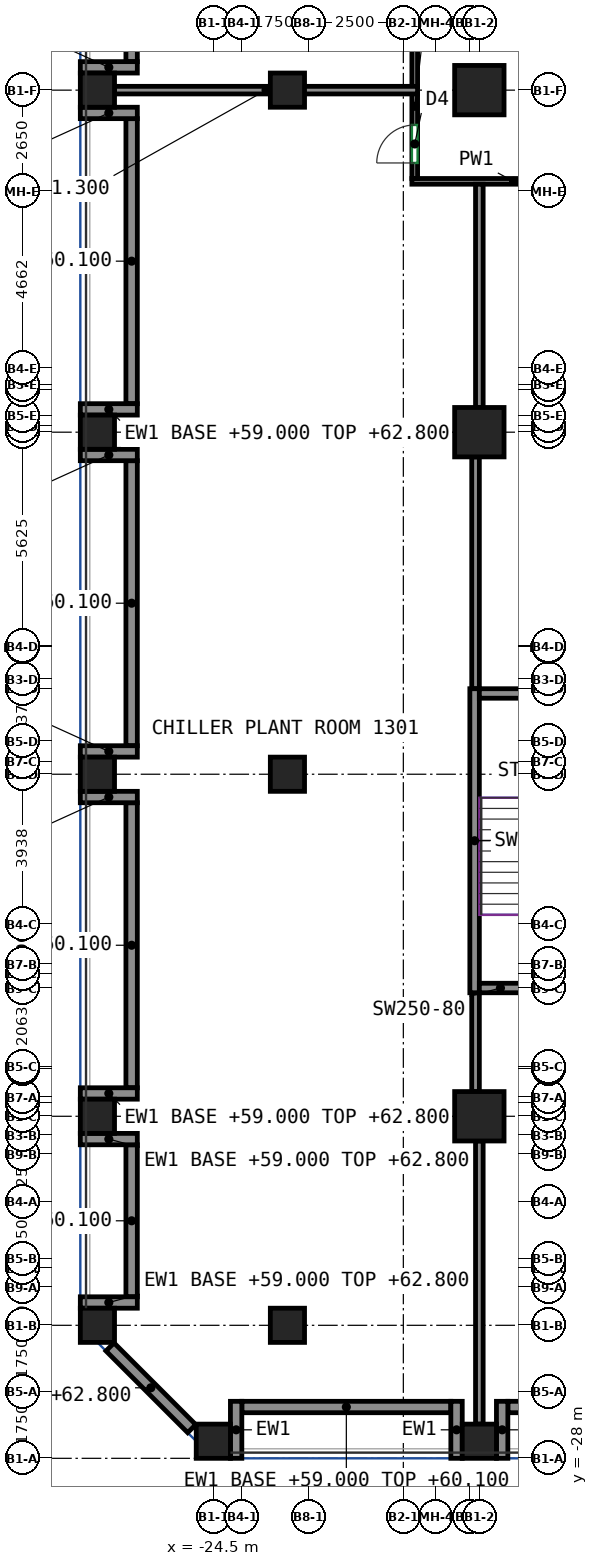
"""IFC4 building model, lengths in metres.
Left out: names, types, materials, properties, quantities, classifications, styles, units other than length and angle.
Written with IfcOpenShell. Run it as: python <this file> out.ifc"""

import sys

from ifc_helpers import new_model, si_unit, direction, frame, frame_2d, origin, origin_2d, place, context, subcontext, project, spatial, rectangle, extrude, source, transform, mapped, element, fill, save


model = new_model("IFC4")
c1 = context("Model", 3, precision=1e-05, world=origin(), true_north=direction((0.0, 1.0)))
c2 = subcontext(c1, "Body", "Model", "MODEL_VIEW")
j1 = project(units=[si_unit("LENGTHUNIT", "METRE"), si_unit("PLANEANGLEUNIT", "RADIAN")], contexts=[c1])
p1 = place(None, origin())
s1 = spatial("IfcSite", under=j1, at=p1, CompositionType="ELEMENT")
p2 = place(p1, origin())
s2 = spatial("IfcBuilding", under=s1, at=p2, CompositionType="ELEMENT")
p3 = place(p2, frame((0.0, 0.0, 59.0)))
s3 = spatial("IfcBuildingStorey", under=s2, at=p3, CompositionType="ELEMENT", Elevation=59.0)
m1 = source(origin(), c2, "Body", "SweptSolid", [
    extrude(rectangle(XDim=0.9, YDim=0.9, at=origin_2d()), origin(), (0.0, 0.0, 1.0), 3.8),
])
p4 = place(p3, frame((-27.55, -24.5, 0.0), z_axis=(0.0, 0.0, 1.0), x_axis=(1.0, 0.0, 0.0)))
e1 = element("IfcColumn", 1, at=p4, inside=s3, PredefinedType="COLUMN", context=c2, shape_type="MappedRepresentation", body=[
    mapped(m1, transform((0.0, 0.0, 0.0))),
])
m2 = source(origin(), c2, "Body", "SweptSolid", [
    extrude(rectangle(XDim=0.9, YDim=0.9, at=origin_2d()), origin(), (0.0, 0.0, 1.0), 2.3),
])
for number, where, z_axis, x_axis in (
    (2, (-27.55, -19.0, 0.0), (0.0, 0.0, 1.0), (1.0, 0.0, 0.0)),
    (3, (-27.55, -10.0, 0.0), (0.0, 0.0, 1.0), (1.0, 0.0, 0.0)),
    (4, (-27.55, -1.0, 0.0), (0.0, 0.0, 1.0), (1.0, 0.0, 0.0)),
    (5, (-27.55, 8.0, 0.0), (0.0, 0.0, 1.0), (1.0, 0.0, 0.0)),
    (6, (-24.5, -27.55, 0.0), (0.0, 0.0, 1.0), (1.0, 0.0, 0.0)),
    (7, (-17.5, -27.55, 0.0), (0.0, 0.0, 1.0), (1.0, 0.0, 0.0)),
):
    element("IfcColumn", number, at=place(p3, frame(where, z_axis=z_axis, x_axis=x_axis)), inside=s3, PredefinedType="COLUMN", context=c2, shape_type="MappedRepresentation", body=[
        mapped(m2, transform((0.0, 0.0, 0.0))),
    ])
m3 = source(origin(), c2, "Body", "SweptSolid", [
    extrude(rectangle(XDim=1.3, YDim=1.3, at=origin_2d()), origin(), (0.0, 0.0, 1.0), 2.3),
])
for number, where, z_axis, x_axis in (
    (8, (-17.5, -19.0, 0.0), (0.0, 0.0, 1.0), (1.0, 0.0, 0.0)),
    (9, (-17.5, -1.0, 0.0), (0.0, 0.0, 1.0), (1.0, 0.0, 0.0)),
    (10, (-17.5, 8.0, 0.0), (0.0, 0.0, 1.0), (1.0, 0.0, 0.0)),
):
    element("IfcColumn", number, at=place(p3, frame(where, z_axis=z_axis, x_axis=x_axis)), inside=s3, PredefinedType="COLUMN", context=c2, shape_type="MappedRepresentation", body=[
        mapped(m3, transform((0.0, 0.0, 0.0))),
    ])
for number, where, z_axis, x_axis in (
    (11, (-22.55, -24.5, 0.0), (0.0, 0.0, 1.0), (1.0, 0.0, 0.0)),
    (12, (-22.55, -10.0, 0.0), (0.0, 0.0, 1.0), (1.0, 0.0, 0.0)),
    (13, (-22.55, 8.0, 0.0), (0.0, 0.0, 1.0), (1.0, 0.0, 0.0)),
):
    element("IfcColumn", number, at=place(p3, frame(where, z_axis=z_axis, x_axis=x_axis)), inside=s3, PredefinedType="COLUMN", context=c2, shape_type="MappedRepresentation", body=[
        mapped(m1, transform((0.0, 0.0, 0.0))),
    ])
m4 = source(origin(), c2, "Body", "SweptSolid", [
    extrude(rectangle(XDim=8.0, YDim=0.25, at=frame_2d((4.0, 0.0))), origin(), (0.0, 0.0, 1.0), 3.8),
])
p5 = place(p3, frame((-17.625, -15.75, 0.0), z_axis=(0.0, 0.0, 1.0), x_axis=(0.0, 1.0, 0.0)))
e14 = element("IfcWall", 14, at=p5, inside=s3, PredefinedType="SHEAR", context=c2, shape_type="MappedRepresentation", body=[
    mapped(m4, transform((0.0, 0.0, 0.0))),
])
m5 = source(origin(), c2, "Body", "SweptSolid", [
    extrude(rectangle(XDim=3.7, YDim=0.25, at=frame_2d((1.85, 0.0))), origin(), (0.0, 0.0, 1.0), 3.8),
])
p6 = place(p3, frame((-17.5, -15.625, 0.0), z_axis=(0.0, 0.0, 1.0), x_axis=(1.0, 0.0, 0.0)))
e15 = element("IfcWall", 15, at=p6, inside=s3, PredefinedType="SHEAR", context=c2, shape_type="MappedRepresentation", body=[
    mapped(m5, transform((0.0, 0.0, 0.0))),
])
p7 = place(p6, frame((1.25, 0.0, 0.0)))
e16 = element("IfcOpeningElement", 16, at=p7, cuts=e15, PredefinedType="OPENING", context=c2, shape_type="SweptSolid", body=[
    extrude(rectangle(XDim=1.2, YDim=2.1, at=frame_2d((0.6, 1.05))), frame((0.0, 0.135, 0.0), z_axis=(0.0, -1.0, 0.0), x_axis=(1.0, 0.0, 0.0)), (0.0, 0.0, 1.0), 0.27),
])
p8 = place(p3, frame((-17.5, -7.875, 0.0), z_axis=(0.0, 0.0, 1.0), x_axis=(1.0, 0.0, 0.0)))
e17 = element("IfcWall", 17, at=p8, inside=s3, PredefinedType="SHEAR", context=c2, shape_type="MappedRepresentation", body=[
    mapped(m5, transform((0.0, 0.0, 0.0))),
])
m6 = source(origin(), c2, "Body", "SweptSolid", [
    extrude(rectangle(XDim=5.5, YDim=0.3, at=frame_2d((2.75, 0.0))), origin(), (0.0, 0.0, 1.0), 1.1),
])
p9 = place(p3, frame((-23.75, -26.65, 0.0), z_axis=(0.0, 0.0, 1.0), x_axis=(1.0, 0.0, 0.0)))
e18 = element("IfcWall", 18, at=p9, inside=s3, PredefinedType="SOLIDWALL", context=c2, shape_type="MappedRepresentation", body=[
    mapped(m6, transform((0.0, 0.0, 0.0))),
])
m7 = source(origin(), c2, "Body", "SweptSolid", [
    extrude(rectangle(XDim=1.5, YDim=0.3, at=frame_2d((0.75, 0.0))), origin(), (0.0, 0.0, 1.0), 2.3),
])
for number, where, z_axis, x_axis in (
    (19, (-23.9, -28.0, 0.0), (0.0, 0.0, 1.0), (0.0, 1.0, 0.0)),
    (20, (-18.1, -28.0, 0.0), (0.0, 0.0, 1.0), (0.0, 1.0, 0.0)),
):
    element("IfcWall", number, at=place(p3, frame(where, z_axis=z_axis, x_axis=x_axis)), inside=s3, PredefinedType="SOLIDWALL", context=c2, shape_type="MappedRepresentation", body=[
        mapped(m7, transform((0.0, 0.0, 0.0))),
    ])
p10 = place(p3, frame((-16.75, -26.65, 0.0), z_axis=(0.0, 0.0, 1.0), x_axis=(1.0, 0.0, 0.0)))
e21 = element("IfcWall", 21, at=p10, inside=s3, PredefinedType="SOLIDWALL", context=c2, shape_type="MappedRepresentation", body=[
    mapped(m6, transform((0.0, 0.0, 0.0))),
])
p11 = place(p3, frame((-16.9, -28.0, 0.0), z_axis=(0.0, 0.0, 1.0), x_axis=(0.0, 1.0, 0.0)))
e22 = element("IfcWall", 22, at=p11, inside=s3, PredefinedType="SOLIDWALL", context=c2, shape_type="MappedRepresentation", body=[
    mapped(m7, transform((0.0, 0.0, 0.0))),
])
m8 = source(origin(), c2, "Body", "SweptSolid", [
    extrude(rectangle(XDim=14.682, YDim=0.3, at=frame_2d((7.341, 0.0))), origin(), (0.0, 0.0, 1.0), 1.1),
])
p12 = place(p3, frame((-26.65, 23.432, 0.0), z_axis=(0.0, 0.0, 1.0), x_axis=(0.0, -1.0, 0.0)))
e23 = element("IfcWall", 23, at=p12, inside=s3, PredefinedType="SOLIDWALL", context=c2, shape_type="MappedRepresentation", body=[
    mapped(m8, transform((0.0, 0.0, 0.0))),
])
m9 = source(origin(), c2, "Body", "SweptSolid", [
    extrude(rectangle(XDim=1.5, YDim=0.3, at=frame_2d((0.75, 0.0))), origin(), (0.0, 0.0, 1.0), 3.8),
])
p13 = place(p3, frame((-28.0, 8.6, 0.0), z_axis=(0.0, 0.0, 1.0), x_axis=(1.0, 0.0, 0.0)))
e24 = element("IfcWall", 24, at=p13, inside=s3, PredefinedType="SOLIDWALL", context=c2, shape_type="MappedRepresentation", body=[
    mapped(m9, transform((0.0, 0.0, 0.0))),
])
m10 = source(origin(), c2, "Body", "SweptSolid", [
    extrude(rectangle(XDim=7.5, YDim=0.3, at=frame_2d((3.75, 0.0))), origin(), (0.0, 0.0, 1.0), 1.1),
])
p14 = place(p3, frame((-26.65, 7.25, 0.0), z_axis=(0.0, 0.0, 1.0), x_axis=(0.0, -1.0, 0.0)))
e25 = element("IfcWall", 25, at=p14, inside=s3, PredefinedType="SOLIDWALL", context=c2, shape_type="MappedRepresentation", body=[
    mapped(m10, transform((0.0, 0.0, 0.0))),
])
for number, where, z_axis, x_axis in (
    (26, (-28.0, 7.4, 0.0), (0.0, 0.0, 1.0), (1.0, 0.0, 0.0)),
    (27, (-28.0, -0.4, 0.0), (0.0, 0.0, 1.0), (1.0, 0.0, 0.0)),
):
    element("IfcWall", number, at=place(p3, frame(where, z_axis=z_axis, x_axis=x_axis)), inside=s3, PredefinedType="SOLIDWALL", context=c2, shape_type="MappedRepresentation", body=[
        mapped(m9, transform((0.0, 0.0, 0.0))),
    ])
p15 = place(p3, frame((-26.65, -1.75, 0.0), z_axis=(0.0, 0.0, 1.0), x_axis=(0.0, -1.0, 0.0)))
e28 = element("IfcWall", 28, at=p15, inside=s3, PredefinedType="SOLIDWALL", context=c2, shape_type="MappedRepresentation", body=[
    mapped(m10, transform((0.0, 0.0, 0.0))),
])
for number, where, z_axis, x_axis in (
    (29, (-28.0, -1.6, 0.0), (0.0, 0.0, 1.0), (1.0, 0.0, 0.0)),
    (30, (-28.0, -9.4, 0.0), (0.0, 0.0, 1.0), (1.0, 0.0, 0.0)),
):
    element("IfcWall", number, at=place(p3, frame(where, z_axis=z_axis, x_axis=x_axis)), inside=s3, PredefinedType="SOLIDWALL", context=c2, shape_type="MappedRepresentation", body=[
        mapped(m9, transform((0.0, 0.0, 0.0))),
    ])
p16 = place(p3, frame((-26.65, -10.75, 0.0), z_axis=(0.0, 0.0, 1.0), x_axis=(0.0, -1.0, 0.0)))
e31 = element("IfcWall", 31, at=p16, inside=s3, PredefinedType="SOLIDWALL", context=c2, shape_type="MappedRepresentation", body=[
    mapped(m10, transform((0.0, 0.0, 0.0))),
])
for number, where, z_axis, x_axis in (
    (32, (-28.0, -10.6, 0.0), (0.0, 0.0, 1.0), (1.0, 0.0, 0.0)),
    (33, (-28.0, -18.4, 0.0), (0.0, 0.0, 1.0), (1.0, 0.0, 0.0)),
):
    element("IfcWall", number, at=place(p3, frame(where, z_axis=z_axis, x_axis=x_axis)), inside=s3, PredefinedType="SOLIDWALL", context=c2, shape_type="MappedRepresentation", body=[
        mapped(m9, transform((0.0, 0.0, 0.0))),
    ])
m11 = source(origin(), c2, "Body", "SweptSolid", [
    extrude(rectangle(XDim=4.0, YDim=0.3, at=frame_2d((2.0, 0.0))), origin(), (0.0, 0.0, 1.0), 1.1),
])
p17 = place(p3, frame((-26.65, -19.75, 0.0), z_axis=(0.0, 0.0, 1.0), x_axis=(0.0, -1.0, 0.0)))
e34 = element("IfcWall", 34, at=p17, inside=s3, PredefinedType="SOLIDWALL", context=c2, shape_type="MappedRepresentation", body=[
    mapped(m11, transform((0.0, 0.0, 0.0))),
])
for number, where, z_axis, x_axis in (
    (35, (-28.0, -19.6, 0.0), (0.0, 0.0, 1.0), (1.0, 0.0, 0.0)),
    (36, (-28.0, -23.9, 0.0), (0.0, 0.0, 1.0), (1.0, 0.0, 0.0)),
):
    element("IfcWall", number, at=place(p3, frame(where, z_axis=z_axis, x_axis=x_axis)), inside=s3, PredefinedType="SOLIDWALL", context=c2, shape_type="MappedRepresentation", body=[
        mapped(m9, transform((0.0, 0.0, 0.0))),
    ])
m12 = source(origin(), c2, "Body", "SweptSolid", [
    extrude(rectangle(XDim=3.041, YDim=0.3, at=frame_2d((1.521, 0.0))), origin(), (0.0, 0.0, 1.0), 3.8),
])
p18 = place(p3, frame((-27.219, -25.069, 0.0), z_axis=(0.0, 0.0, 1.0), x_axis=(0.707106781187, -0.707106781187, 0.0)))
e37 = element("IfcWall", 37, at=p18, inside=s3, PredefinedType="SOLIDWALL", context=c2, shape_type="MappedRepresentation", body=[
    mapped(m12, transform((0.0, 0.0, 0.0))),
])
p19 = place(p3, frame((-19.275, 5.6, 0.0), z_axis=(0.0, 0.0, 1.0), x_axis=(1.0, 0.0, 0.0)))
e38 = element("IfcWall", 38, at=p19, inside=s3, PredefinedType="PARTITIONING", context=c2, shape_type="SweptSolid", body=[
    extrude(rectangle(XDim=5.35, YDim=0.15, at=frame_2d((2.675, 0.0))), origin(), (0.0, 0.0, 1.0), 3.8),
])
p20 = place(p19, frame((3.318, 0.0, 0.0)))
e39 = element("IfcOpeningElement", 39, at=p20, cuts=e38, PredefinedType="OPENING", context=c2, shape_type="SweptSolid", body=[
    extrude(rectangle(XDim=1.0, YDim=2.1, at=frame_2d((0.5, 1.05))), frame((0.0, 0.085, 0.0), z_axis=(0.0, -1.0, 0.0), x_axis=(1.0, 0.0, 0.0)), (0.0, 0.0, 1.0), 0.17),
])
p21 = place(p3, frame((-19.2, 5.675, 0.0), z_axis=(0.0, 0.0, 1.0), x_axis=(0.0, 1.0, 0.0)))
e40 = element("IfcWall", 40, at=p21, inside=s3, PredefinedType="PARTITIONING", context=c2, shape_type="SweptSolid", body=[
    extrude(rectangle(XDim=2.235, YDim=0.15, at=frame_2d((1.117, 0.0))), origin(), (0.0, 0.0, 1.0), 3.15),
])
p22 = place(p21, frame((0.409, 0.0, 0.0)))
e41 = element("IfcOpeningElement", 41, at=p22, cuts=e40, PredefinedType="OPENING", context=c2, shape_type="SweptSolid", body=[
    extrude(rectangle(XDim=1.0, YDim=2.1, at=frame_2d((0.5, 1.05))), frame((0.0, 0.085, 0.0), z_axis=(0.0, -1.0, 0.0), x_axis=(1.0, 0.0, 0.0)), (0.0, 0.0, 1.0), 0.17),
])
p23 = place(p3, frame((-19.2, 8.09, 0.0), z_axis=(0.0, 0.0, 1.0), x_axis=(0.0, 1.0, 0.0)))
e42 = element("IfcWall", 42, at=p23, inside=s3, PredefinedType="PARTITIONING", context=c2, shape_type="SweptSolid", body=[
    extrude(rectangle(XDim=16.335, YDim=0.15, at=frame_2d((8.167, 0.0))), origin(), (0.0, 0.0, 1.0), 3.15),
])
p24 = place(p3, frame((-17.5, -0.35, 0.0), z_axis=(0.0, 0.0, 1.0), x_axis=(0.0, 1.0, 0.0)))
e43 = element("IfcWall", 43, at=p24, inside=s3, PredefinedType="PARTITIONING", context=c2, shape_type="SweptSolid", body=[
    extrude(rectangle(XDim=5.874, YDim=0.2, at=frame_2d((2.937, 0.0))), origin(), (0.0, 0.0, 1.0), 3.8),
])
p25 = place(p3, frame((-17.6, -7.75, 0.0), z_axis=(0.0, 0.0, 1.0), x_axis=(0.0, 1.0, 0.0)))
e44 = element("IfcWall", 44, at=p25, inside=s3, PredefinedType="PARTITIONING", context=c2, shape_type="SweptSolid", body=[
    extrude(rectangle(XDim=6.1, YDim=0.2, at=frame_2d((3.05, 0.0))), origin(), (0.0, 0.0, 1.0), 3.8),
])
p26 = place(p3, frame((-17.6, -18.35, 0.0), z_axis=(0.0, 0.0, 1.0), x_axis=(0.0, 1.0, 0.0)))
e45 = element("IfcWall", 45, at=p26, inside=s3, PredefinedType="PARTITIONING", context=c2, shape_type="SweptSolid", body=[
    extrude(rectangle(XDim=2.6, YDim=0.2, at=frame_2d((1.3, 0.0))), origin(), (0.0, 0.0, 1.0), 3.8),
])
p27 = place(p3, frame((-17.5, -27.1, 0.0), z_axis=(0.0, 0.0, 1.0), x_axis=(0.0, 1.0, 0.0)))
e46 = element("IfcWall", 46, at=p27, inside=s3, PredefinedType="PARTITIONING", context=c2, shape_type="SweptSolid", body=[
    extrude(rectangle(XDim=7.45, YDim=0.2, at=frame_2d((3.725, 0.0))), origin(), (0.0, 0.0, 1.0), 3.8),
])
p28 = place(p3, frame((-27.1, 8.0, 0.0), z_axis=(0.0, 0.0, 1.0), x_axis=(1.0, 0.0, 0.0)))
e47 = element("IfcWall", 47, at=p28, inside=s3, PredefinedType="PARTITIONING", context=c2, shape_type="SweptSolid", body=[
    extrude(rectangle(XDim=7.974, YDim=0.2, at=frame_2d((3.987, 0.0))), origin(), (0.0, 0.0, 1.0), 2.3),
])
p29 = place(p22, origin())
e48 = element("IfcDoor", 48, at=p29, inside=s3, OperationType="SINGLE_SWING_LEFT", PredefinedType="DOOR", context=c2, shape_type="SweptSolid", body=[
    extrude(rectangle(XDim=1.0, YDim=2.1, at=frame_2d((0.5, 1.05))), frame((0.0, 0.025, 0.0), z_axis=(0.0, -1.0, 0.0), x_axis=(1.0, 0.0, 0.0)), (0.0, 0.0, 1.0), 0.05),
])
fill(e41, e48)
save(model, sys.argv[1])
